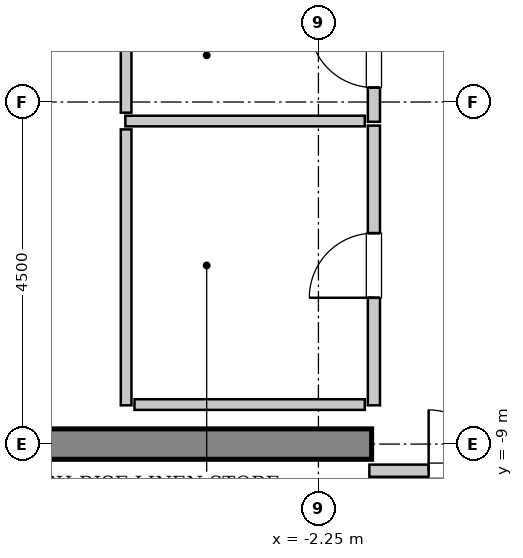
"""IFC4 building model, lengths in metres.
Left out: names, types, materials, properties, quantities, classifications, styles, units other than length and angle.
Written with IfcOpenShell. Run it as: python <this file> out.ifc"""

import sys

from ifc_helpers import new_model, si_unit, direction, frame, frame_2d, origin, place, context, subcontext, project, spatial, rectangle, extrude, source, transform, mapped, element, fill, save


model = new_model("IFC4")
c1 = context("Model", 3, precision=1e-05, world=origin(), true_north=direction((0.0, 1.0)))
c2 = subcontext(c1, "Body", "Model", "MODEL_VIEW")
j1 = project(units=[si_unit("LENGTHUNIT", "METRE"), si_unit("PLANEANGLEUNIT", "RADIAN")], contexts=[c1])
p1 = place(None, origin())
s1 = spatial("IfcSite", under=j1, at=p1, CompositionType="ELEMENT")
p2 = place(p1, origin())
s2 = spatial("IfcBuilding", under=s1, at=p2, CompositionType="ELEMENT")
p3 = place(p2, frame((0.0, 0.0, 349.0)))
s3 = spatial("IfcBuildingStorey", under=s2, at=p3, CompositionType="ELEMENT", Elevation=349.0)
m1 = source(origin(), c2, "Body", "SweptSolid", [
    extrude(rectangle(XDim=9.9, YDim=0.4, at=frame_2d((4.95, 0.0))), origin(), (0.0, 0.0, 1.0), 4.8),
])
p4 = place(p3, frame((-11.45, -9.0, 0.0), z_axis=(0.0, 0.0, 1.0), x_axis=(1.0, 0.0, 0.0)))
e1 = element("IfcWall", 1, at=p4, inside=s3, PredefinedType="SHEAR", context=c2, shape_type="MappedRepresentation", body=[
    mapped(m1, transform((0.0, 0.0, 0.0), x_axis=(1.0, 0.0, 0.0), y_axis=(0.0, 1.0, 0.0), z_axis=(0.0, 0.0, 1.0), scale=1.0)),
])
m2 = source(origin(), c2, "Body", "SweptSolid", [
    extrude(rectangle(XDim=3.16, YDim=0.16, at=frame_2d((1.58, 0.0))), origin(), (0.0, 0.0, 1.0), 3.575),
])
p5 = place(p3, frame((-1.58, -9.35, 0.0), z_axis=(0.0, 0.0, 1.0), x_axis=(1.0, 0.0, 0.0)))
e2 = element("IfcWall", 2, at=p5, inside=s3, PredefinedType="PARTITIONING", context=c2, shape_type="MappedRepresentation", body=[
    mapped(m2, transform((0.0, 0.0, 0.0), x_axis=(1.0, 0.0, 0.0), y_axis=(0.0, 1.0, 0.0), z_axis=(0.0, 0.0, 1.0), scale=1.0)),
])
p6 = place(p5, frame((0.78, 0.0, 0.0)))
e3 = element("IfcOpeningElement", 3, at=p6, cuts=e2, PredefinedType="OPENING", context=c2, shape_type="SweptSolid", body=[
    extrude(rectangle(XDim=1.6, YDim=2.3, at=frame_2d((0.8, 1.15))), frame((0.0, 0.09, 0.0), z_axis=(0.0, -1.0, 0.0), x_axis=(1.0, 0.0, 0.0)), (0.0, 0.0, 1.0), 0.18),
])
m3 = source(origin(), c2, "Body", "SweptSolid", [
    extrude(rectangle(XDim=1.75, YDim=0.16, at=frame_2d((0.875, 0.0))), origin(), (0.0, 0.0, 1.0), 4.485),
])
p7 = place(p3, frame((-1.52, -4.76, 0.0), z_axis=(0.0, 0.0, 1.0), x_axis=(0.0, 1.0, 0.0)))
e4 = element("IfcWall", 4, at=p7, inside=s3, PredefinedType="PARTITIONING", context=c2, shape_type="MappedRepresentation", body=[
    mapped(m3, transform((0.0, 0.0, 0.0), x_axis=(1.0, 0.0, 0.0), y_axis=(0.0, 1.0, 0.0), z_axis=(0.0, 0.0, 1.0), scale=1.0)),
])
p8 = place(p7, frame((0.45, 0.0, 0.0)))
e5 = element("IfcOpeningElement", 5, at=p8, cuts=e4, PredefinedType="OPENING", context=c2, shape_type="SweptSolid", body=[
    extrude(rectangle(XDim=0.85, YDim=2.1, at=frame_2d((0.425, 1.05))), frame((0.0, 0.09, 0.0), z_axis=(0.0, -1.0, 0.0), x_axis=(1.0, 0.0, 0.0)), (0.0, 0.0, 1.0), 0.18),
])
m4 = source(origin(), c2, "Body", "SweptSolid", [
    extrude(rectangle(XDim=3.15, YDim=0.14, at=frame_2d((1.575, 0.0))), origin(), (0.0, 0.0, 1.0), 4.485),
])
p9 = place(p3, frame((-4.79, -4.75, 0.0), z_axis=(0.0, 0.0, 1.0), x_axis=(1.0, 0.0, 0.0)))
e6 = element("IfcWall", 6, at=p9, inside=s3, PredefinedType="PARTITIONING", context=c2, shape_type="MappedRepresentation", body=[
    mapped(m4, transform((0.0, 0.0, 0.0), x_axis=(1.0, 0.0, 0.0), y_axis=(0.0, 1.0, 0.0), z_axis=(0.0, 0.0, 1.0), scale=1.0)),
])
m5 = source(origin(), c2, "Body", "SweptSolid", [
    extrude(rectangle(XDim=1.6, YDim=0.14, at=frame_2d((0.8, 0.0))), origin(), (0.0, 0.0, 1.0), 4.485),
])
p10 = place(p3, frame((-4.78, -4.64, 0.0), z_axis=(0.0, 0.0, 1.0), x_axis=(0.0, 1.0, 0.0)))
e7 = element("IfcWall", 7, at=p10, inside=s3, PredefinedType="PARTITIONING", context=c2, shape_type="MappedRepresentation", body=[
    mapped(m5, transform((0.0, 0.0, 0.0), x_axis=(1.0, 0.0, 0.0), y_axis=(0.0, 1.0, 0.0), z_axis=(0.0, 0.0, 1.0), scale=1.0)),
])
m6 = source(origin(), c2, "Body", "SweptSolid", [
    extrude(rectangle(XDim=3.68, YDim=0.16, at=frame_2d((1.84, 0.0))), origin(), (0.0, 0.0, 1.0), 4.485),
])
p11 = place(p3, frame((-1.52, -8.49, 0.0), z_axis=(0.0, 0.0, 1.0), x_axis=(0.0, 1.0, 0.0)))
e8 = element("IfcWall", 8, at=p11, inside=s3, PredefinedType="PARTITIONING", context=c2, shape_type="MappedRepresentation", body=[
    mapped(m6, transform((0.0, 0.0, 0.0), x_axis=(1.0, 0.0, 0.0), y_axis=(0.0, 1.0, 0.0), z_axis=(0.0, 0.0, 1.0), scale=1.0)),
])
p12 = place(p11, frame((1.415, 0.0, 0.0)))
e9 = element("IfcOpeningElement", 9, at=p12, cuts=e8, PredefinedType="OPENING", context=c2, shape_type="SweptSolid", body=[
    extrude(rectangle(XDim=0.85, YDim=2.1, at=frame_2d((0.425, 1.05))), frame((0.0, 0.09, 0.0), z_axis=(0.0, -1.0, 0.0), x_axis=(1.0, 0.0, 0.0)), (0.0, 0.0, 1.0), 0.18),
])
m7 = source(origin(), c2, "Body", "SweptSolid", [
    extrude(rectangle(XDim=3.63, YDim=0.14, at=frame_2d((1.815, 0.0))), origin(), (0.0, 0.0, 1.0), 4.485),
])
p13 = place(p3, frame((-4.78, -8.49, 0.0), z_axis=(0.0, 0.0, 1.0), x_axis=(0.0, 1.0, 0.0)))
e10 = element("IfcWall", 10, at=p13, inside=s3, PredefinedType="PARTITIONING", context=c2, shape_type="MappedRepresentation", body=[
    mapped(m7, transform((0.0, 0.0, 0.0), x_axis=(1.0, 0.0, 0.0), y_axis=(0.0, 1.0, 0.0), z_axis=(0.0, 0.0, 1.0), scale=1.0)),
])
m8 = source(origin(), c2, "Body", "SweptSolid", [
    extrude(rectangle(XDim=3.03, YDim=0.14, at=frame_2d((1.515, 0.0))), origin(), (0.0, 0.0, 1.0), 4.485),
])
p14 = place(p3, frame((-4.67, -8.48, 0.0), z_axis=(0.0, 0.0, 1.0), x_axis=(1.0, 0.0, 0.0)))
e11 = element("IfcWall", 11, at=p14, inside=s3, PredefinedType="PARTITIONING", context=c2, shape_type="MappedRepresentation", body=[
    mapped(m8, transform((0.0, 0.0, 0.0), x_axis=(1.0, 0.0, 0.0), y_axis=(0.0, 1.0, 0.0), z_axis=(0.0, 0.0, 1.0), scale=1.0)),
])
m9 = source(origin(), c2, "Body", "SweptSolid", [
    extrude(rectangle(XDim=1.6, YDim=2.3, at=frame_2d((0.8, 1.15))), frame((0.0, 0.025, 0.0), z_axis=(0.0, -1.0, 0.0), x_axis=(1.0, 0.0, 0.0)), (0.0, 0.0, 1.0), 0.05),
])
p15 = place(p6, origin())
e12 = element("IfcDoor", 12, at=p15, inside=s3, OperationType="DOUBLE_DOOR_SINGLE_SWING", PredefinedType="DOOR", context=c2, shape_type="MappedRepresentation", body=[
    mapped(m9, transform((0.0, 0.0, 0.0), x_axis=(1.0, 0.0, 0.0), y_axis=(0.0, 1.0, 0.0), z_axis=(0.0, 0.0, 1.0), scale=1.0)),
])
fill(e3, e12)
m10 = source(origin(), c2, "Body", "SweptSolid", [
    extrude(rectangle(XDim=0.85, YDim=2.1, at=frame_2d((0.425, 1.05))), frame((0.0, 0.025, 0.0), z_axis=(0.0, -1.0, 0.0), x_axis=(1.0, 0.0, 0.0)), (0.0, 0.0, 1.0), 0.05),
])
p16 = place(p8, origin())
e13 = element("IfcDoor", 13, at=p16, inside=s3, OperationType="SINGLE_SWING_RIGHT", PredefinedType="DOOR", context=c2, shape_type="MappedRepresentation", body=[
    mapped(m10, transform((0.0, 0.0, 0.0), x_axis=(1.0, 0.0, 0.0), y_axis=(0.0, 1.0, 0.0), z_axis=(0.0, 0.0, 1.0), scale=1.0)),
])
fill(e5, e13)
p17 = place(p12, origin())
e14 = element("IfcDoor", 14, at=p17, inside=s3, OperationType="SINGLE_SWING_LEFT", PredefinedType="DOOR", context=c2, shape_type="MappedRepresentation", body=[
    mapped(m10, transform((0.0, 0.0, 0.0), x_axis=(1.0, 0.0, 0.0), y_axis=(0.0, 1.0, 0.0), z_axis=(0.0, 0.0, 1.0), scale=1.0)),
])
fill(e9, e14)
save(model, sys.argv[1])
